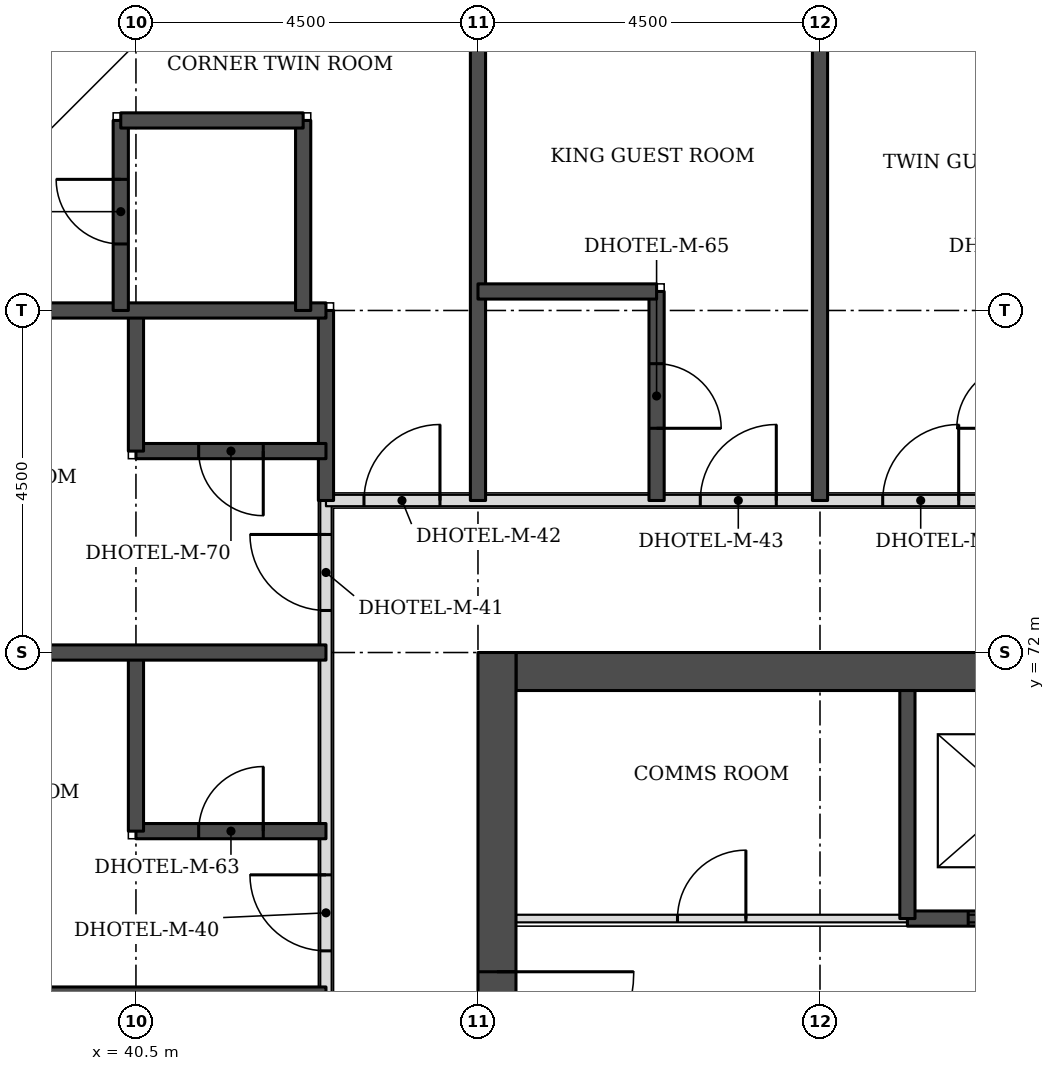
"""IFC4 building model, lengths in metres.
Left out: names, types, materials, properties, quantities, classifications, styles, units other than length and angle.
Written with IfcOpenShell. Run it as: python <this file> out.ifc"""

import sys

from ifc_helpers import new_model, si_unit, direction, frame, frame_2d, origin, place, context, subcontext, project, spatial, rectangle, extrude, element, fill, save


model = new_model("IFC4")
c1 = context("Model", 3, precision=1e-05, world=origin(), true_north=direction((0.0, 1.0)))
c2 = subcontext(c1, "Body", "Model", "MODEL_VIEW")
j1 = project(units=[si_unit("LENGTHUNIT", "METRE"), si_unit("PLANEANGLEUNIT", "RADIAN")], contexts=[c1])
p1 = place(None, origin())
s1 = spatial("IfcSite", under=j1, at=p1, CompositionType="ELEMENT")
p2 = place(p1, origin())
s2 = spatial("IfcBuilding", under=s1, at=p2, CompositionType="ELEMENT")
p3 = place(p2, frame((0.0, 0.0, 23.1)))
s3 = spatial("IfcBuildingStorey", under=s2, at=p3, CompositionType="ELEMENT", Elevation=23.1)
p4 = place(p3, frame((45.5, 71.75, 0.0), z_axis=(0.0, 0.0, 1.0), x_axis=(1.0, 0.0, 0.0)))
e1 = element("IfcWall", 1, at=p4, inside=s3, PredefinedType="SHEAR", context=c2, shape_type="SweptSolid", body=[
    extrude(rectangle(XDim=21.5, YDim=0.5, at=frame_2d((10.75, 0.0))), origin(), (0.0, 0.0, 1.0), 3.3),
])
p5 = place(p3, frame((45.25, 49.5, 0.0), z_axis=(0.0, 0.0, 1.0), x_axis=(0.0, 1.0, 0.0)))
e2 = element("IfcWall", 2, at=p5, inside=s3, PredefinedType="SHEAR", context=c2, shape_type="SweptSolid", body=[
    extrude(rectangle(XDim=22.5, YDim=0.5, at=frame_2d((11.25, 0.0))), origin(), (0.0, 0.0, 1.0), 3.3),
])
p6 = place(p5, frame((4.2, 0.0, 0.0)))
e3 = element("IfcOpeningElement", 3, at=p6, cuts=e2, PredefinedType="OPENING", context=c2, shape_type="SweptSolid", body=[
    extrude(rectangle(XDim=1.8, YDim=2.1, at=frame_2d((0.9, 1.05))), frame((0.0, 0.26, 0.0), z_axis=(0.0, -1.0, 0.0), x_axis=(1.0, 0.0, 0.0)), (0.0, 0.0, 1.0), 0.52),
])
p7 = place(p5, frame((6.9, 0.0, 0.0)))
e4 = element("IfcOpeningElement", 4, at=p7, cuts=e2, PredefinedType="OPENING", context=c2, shape_type="SweptSolid", body=[
    extrude(rectangle(XDim=1.1, YDim=2.1, at=frame_2d((0.55, 1.05))), frame((0.0, 0.26, 0.0), z_axis=(0.0, -1.0, 0.0), x_axis=(1.0, 0.0, 0.0)), (0.0, 0.0, 1.0), 0.52),
])
p8 = place(p5, frame((13.6, 0.0, 0.0)))
e5 = element("IfcOpeningElement", 5, at=p8, cuts=e2, PredefinedType="OPENING", context=c2, shape_type="SweptSolid", body=[
    extrude(rectangle(XDim=1.1, YDim=2.1, at=frame_2d((0.55, 1.05))), frame((0.0, 0.26, 0.0), z_axis=(0.0, -1.0, 0.0), x_axis=(1.0, 0.0, 0.0)), (0.0, 0.0, 1.0), 0.52),
])
p9 = place(p5, frame((16.5, 0.0, 0.0)))
e6 = element("IfcOpeningElement", 6, at=p9, cuts=e2, PredefinedType="OPENING", context=c2, shape_type="SweptSolid", body=[
    extrude(rectangle(XDim=1.8, YDim=2.1, at=frame_2d((0.9, 1.05))), frame((0.0, 0.26, 0.0), z_axis=(0.0, -1.0, 0.0), x_axis=(1.0, 0.0, 0.0)), (0.0, 0.0, 1.0), 0.52),
])
p10 = place(p3, frame((40.23, 81.826, 0.0), z_axis=(0.0, 0.0, 1.0), x_axis=(-0.707106781187, -0.707106781187, 0.0)))
e7 = element("IfcWall", 7, at=p10, inside=s3, PredefinedType="STANDARD", context=c2, shape_type="SweptSolid", body=[
    extrude(rectangle(XDim=7.151, YDim=0.35, at=frame_2d((3.576, 0.0))), origin(), (0.0, 0.0, 1.0), 3.055),
])
p11 = place(p10, frame((1.926, 0.0, 0.8)))
e8 = element("IfcOpeningElement", 8, at=p11, cuts=e7, PredefinedType="OPENING", context=c2, shape_type="SweptSolid", body=[
    extrude(rectangle(XDim=3.3, YDim=1.5, at=frame_2d((1.65, 0.75))), frame((0.0, 0.185, 0.0), z_axis=(0.0, -1.0, 0.0), x_axis=(1.0, 0.0, 0.0)), (0.0, 0.0, 1.0), 0.37),
])
p12 = place(p3, frame((43.0, 56.6, 0.0), z_axis=(0.0, 0.0, 1.0), x_axis=(0.0, 1.0, 0.0)))
e9 = element("IfcWall", 9, at=p12, inside=s3, PredefinedType="PARTITIONING", context=c2, shape_type="SweptSolid", body=[
    extrude(rectangle(XDim=17.4, YDim=0.15, at=frame_2d((8.7, 0.0))), origin(), (0.0, 0.0, 1.0), 3.08),
])
p13 = place(p12, frame((9.075, 0.0, 0.0)))
e10 = element("IfcOpeningElement", 10, at=p13, cuts=e9, PredefinedType="OPENING", context=c2, shape_type="SweptSolid", body=[
    extrude(rectangle(XDim=1.0, YDim=2.1, at=frame_2d((0.5, 1.05))), frame((0.0, 0.085, 0.0), z_axis=(0.0, -1.0, 0.0), x_axis=(1.0, 0.0, 0.0)), (0.0, 0.0, 1.0), 0.17),
])
p14 = place(p12, frame((11.475, 0.0, 0.0)))
e11 = element("IfcOpeningElement", 11, at=p14, cuts=e9, PredefinedType="OPENING", context=c2, shape_type="SweptSolid", body=[
    extrude(rectangle(XDim=1.0, YDim=2.1, at=frame_2d((0.5, 1.05))), frame((0.0, 0.085, 0.0), z_axis=(0.0, -1.0, 0.0), x_axis=(1.0, 0.0, 0.0)), (0.0, 0.0, 1.0), 0.17),
])
p15 = place(p12, frame((15.953, 0.0, 0.0)))
e12 = element("IfcOpeningElement", 12, at=p15, cuts=e9, PredefinedType="OPENING", context=c2, shape_type="SweptSolid", body=[
    extrude(rectangle(XDim=1.0, YDim=2.1, at=frame_2d((0.5, 1.05))), frame((0.0, 0.085, 0.0), z_axis=(0.0, -1.0, 0.0), x_axis=(1.0, 0.0, 0.0)), (0.0, 0.0, 1.0), 0.17),
])
p16 = place(p3, frame((43.0, 74.0, 0.0), z_axis=(0.0, 0.0, 1.0), x_axis=(1.0, 0.0, 0.0)))
e13 = element("IfcWall", 13, at=p16, inside=s3, PredefinedType="PARTITIONING", context=c2, shape_type="SweptSolid", body=[
    extrude(rectangle(XDim=26.5, YDim=0.15, at=frame_2d((13.25, 0.0))), origin(), (0.0, 0.0, 1.0), 3.08),
])
p17 = place(p16, frame((4.925, 0.0, 0.0)))
e14 = element("IfcOpeningElement", 14, at=p17, cuts=e13, PredefinedType="OPENING", context=c2, shape_type="SweptSolid", body=[
    extrude(rectangle(XDim=1.0, YDim=2.1, at=frame_2d((0.5, 1.05))), frame((0.0, 0.085, 0.0), z_axis=(0.0, -1.0, 0.0), x_axis=(1.0, 0.0, 0.0)), (0.0, 0.0, 1.0), 0.17),
])
p18 = place(p16, frame((7.325, 0.0, 0.0)))
e15 = element("IfcOpeningElement", 15, at=p18, cuts=e13, PredefinedType="OPENING", context=c2, shape_type="SweptSolid", body=[
    extrude(rectangle(XDim=1.0, YDim=2.1, at=frame_2d((0.5, 1.05))), frame((0.0, 0.085, 0.0), z_axis=(0.0, -1.0, 0.0), x_axis=(1.0, 0.0, 0.0)), (0.0, 0.0, 1.0), 0.17),
])
p19 = place(p16, frame((13.925, 0.0, 0.0)))
e16 = element("IfcOpeningElement", 16, at=p19, cuts=e13, PredefinedType="OPENING", context=c2, shape_type="SweptSolid", body=[
    extrude(rectangle(XDim=1.0, YDim=2.1, at=frame_2d((0.5, 1.05))), frame((0.0, 0.085, 0.0), z_axis=(0.0, -1.0, 0.0), x_axis=(1.0, 0.0, 0.0)), (0.0, 0.0, 1.0), 0.17),
])
p20 = place(p16, frame((16.325, 0.0, 0.0)))
e17 = element("IfcOpeningElement", 17, at=p20, cuts=e13, PredefinedType="OPENING", context=c2, shape_type="SweptSolid", body=[
    extrude(rectangle(XDim=1.0, YDim=2.1, at=frame_2d((0.5, 1.05))), frame((0.0, 0.085, 0.0), z_axis=(0.0, -1.0, 0.0), x_axis=(1.0, 0.0, 0.0)), (0.0, 0.0, 1.0), 0.17),
])
p21 = place(p16, frame((22.925, 0.0, 0.0)))
e18 = element("IfcOpeningElement", 18, at=p21, cuts=e13, PredefinedType="OPENING", context=c2, shape_type="SweptSolid", body=[
    extrude(rectangle(XDim=1.0, YDim=2.1, at=frame_2d((0.5, 1.05))), frame((0.0, 0.085, 0.0), z_axis=(0.0, -1.0, 0.0), x_axis=(1.0, 0.0, 0.0)), (0.0, 0.0, 1.0), 0.17),
])
p22 = place(p16, frame((0.5, 0.0, 0.0)))
e19 = element("IfcOpeningElement", 19, at=p22, cuts=e13, PredefinedType="OPENING", context=c2, shape_type="SweptSolid", body=[
    extrude(rectangle(XDim=1.0, YDim=2.1, at=frame_2d((0.5, 1.05))), frame((0.0, 0.085, 0.0), z_axis=(0.0, -1.0, 0.0), x_axis=(1.0, 0.0, 0.0)), (0.0, 0.0, 1.0), 0.17),
])
p23 = place(p16, frame((25.0, 0.0, 0.0)))
e20 = element("IfcOpeningElement", 20, at=p23, cuts=e13, PredefinedType="OPENING", context=c2, shape_type="SweptSolid", body=[
    extrude(rectangle(XDim=1.0, YDim=2.1, at=frame_2d((0.5, 1.05))), frame((0.0, 0.085, 0.0), z_axis=(0.0, -1.0, 0.0), x_axis=(1.0, 0.0, 0.0)), (0.0, 0.0, 1.0), 0.17),
])
p24 = place(p3, frame((36.6, 67.5, 0.0), z_axis=(0.0, 0.0, 1.0), x_axis=(1.0, 0.0, 0.0)))
e21 = element("IfcWall", 21, at=p24, inside=s3, PredefinedType="SOLIDWALL", context=c2, shape_type="SweptSolid", body=[
    extrude(rectangle(XDim=6.4, YDim=0.2, at=frame_2d((3.2, 0.0))), origin(), (0.0, 0.0, 1.0), 3.08),
])
p25 = place(p3, frame((40.5, 69.65, 0.0), z_axis=(0.0, 0.0, 1.0), x_axis=(1.0, 0.0, 0.0)))
e22 = element("IfcWall", 22, at=p25, inside=s3, PredefinedType="SOLIDWALL", context=c2, shape_type="SweptSolid", body=[
    extrude(rectangle(XDim=2.5, YDim=0.2, at=frame_2d((1.25, 0.0))), origin(), (0.0, 0.0, 1.0), 3.08),
])
p26 = place(p25, frame((0.825, 0.0, 0.0)))
e23 = element("IfcOpeningElement", 23, at=p26, cuts=e22, PredefinedType="OPENING", context=c2, shape_type="SweptSolid", body=[
    extrude(rectangle(XDim=0.85, YDim=2.1, at=frame_2d((0.425, 1.05))), frame((0.0, 0.11, 0.0), z_axis=(0.0, -1.0, 0.0), x_axis=(1.0, 0.0, 0.0)), (0.0, 0.0, 1.0), 0.22),
])
p27 = place(p3, frame((40.5, 69.65, 0.0), z_axis=(0.0, 0.0, 1.0), x_axis=(0.0, 1.0, 0.0)))
e24 = element("IfcWall", 24, at=p27, inside=s3, PredefinedType="SOLIDWALL", context=c2, shape_type="SweptSolid", body=[
    extrude(rectangle(XDim=2.35, YDim=0.2, at=frame_2d((1.175, 0.0))), origin(), (0.0, 0.0, 1.0), 3.08),
])
p28 = place(p3, frame((36.6, 72.0, 0.0), z_axis=(0.0, 0.0, 1.0), x_axis=(1.0, 0.0, 0.0)))
e25 = element("IfcWall", 25, at=p28, inside=s3, PredefinedType="SOLIDWALL", context=c2, shape_type="SweptSolid", body=[
    extrude(rectangle(XDim=6.4, YDim=0.2, at=frame_2d((3.2, 0.0))), origin(), (0.0, 0.0, 1.0), 3.08),
])
p29 = place(p3, frame((43.0, 74.0, 0.0), z_axis=(0.0, 0.0, 1.0), x_axis=(0.0, 1.0, 0.0)))
e26 = element("IfcWall", 26, at=p29, inside=s3, PredefinedType="SOLIDWALL", context=c2, shape_type="SweptSolid", body=[
    extrude(rectangle(XDim=2.5, YDim=0.2, at=frame_2d((1.25, 0.0))), origin(), (0.0, 0.0, 1.0), 3.08),
])
p30 = place(p3, frame((45.0, 74.0, 0.0), z_axis=(0.0, 0.0, 1.0), x_axis=(0.0, 1.0, 0.0)))
e27 = element("IfcWall", 27, at=p30, inside=s3, PredefinedType="SOLIDWALL", context=c2, shape_type="SweptSolid", body=[
    extrude(rectangle(XDim=6.4, YDim=0.2, at=frame_2d((3.2, 0.0))), origin(), (0.0, 0.0, 1.0), 3.08),
])
p31 = place(p3, frame((47.35, 74.0, 0.0), z_axis=(0.0, 0.0, 1.0), x_axis=(0.0, 1.0, 0.0)))
e28 = element("IfcWall", 28, at=p31, inside=s3, PredefinedType="SOLIDWALL", context=c2, shape_type="SweptSolid", body=[
    extrude(rectangle(XDim=2.75, YDim=0.2, at=frame_2d((1.375, 0.0))), origin(), (0.0, 0.0, 1.0), 3.08),
])
p32 = place(p31, frame((0.95, 0.0, 0.0)))
e29 = element("IfcOpeningElement", 29, at=p32, cuts=e28, PredefinedType="OPENING", context=c2, shape_type="SweptSolid", body=[
    extrude(rectangle(XDim=0.85, YDim=2.1, at=frame_2d((0.425, 1.05))), frame((0.0, 0.11, 0.0), z_axis=(0.0, -1.0, 0.0), x_axis=(1.0, 0.0, 0.0)), (0.0, 0.0, 1.0), 0.22),
])
p33 = place(p3, frame((49.5, 74.0, 0.0), z_axis=(0.0, 0.0, 1.0), x_axis=(0.0, 1.0, 0.0)))
e30 = element("IfcWall", 30, at=p33, inside=s3, PredefinedType="SOLIDWALL", context=c2, shape_type="SweptSolid", body=[
    extrude(rectangle(XDim=6.4, YDim=0.2, at=frame_2d((3.2, 0.0))), origin(), (0.0, 0.0, 1.0), 3.08),
])
p34 = place(p3, frame((40.5, 74.65, 0.0), z_axis=(0.0, 0.0, 1.0), x_axis=(1.0, 0.0, 0.0)))
e31 = element("IfcWall", 31, at=p34, inside=s3, PredefinedType="SOLIDWALL", context=c2, shape_type="SweptSolid", body=[
    extrude(rectangle(XDim=2.5, YDim=0.2, at=frame_2d((1.25, 0.0))), origin(), (0.0, 0.0, 1.0), 3.08),
])
p35 = place(p34, frame((0.825, 0.0, 0.0)))
e32 = element("IfcOpeningElement", 32, at=p35, cuts=e31, PredefinedType="OPENING", context=c2, shape_type="SweptSolid", body=[
    extrude(rectangle(XDim=0.85, YDim=2.1, at=frame_2d((0.425, 1.05))), frame((0.0, 0.11, 0.0), z_axis=(0.0, -1.0, 0.0), x_axis=(1.0, 0.0, 0.0)), (0.0, 0.0, 1.0), 0.22),
])
p36 = place(p3, frame((40.5, 74.65, 0.0), z_axis=(0.0, 0.0, 1.0), x_axis=(0.0, 1.0, 0.0)))
e33 = element("IfcWall", 33, at=p36, inside=s3, PredefinedType="SOLIDWALL", context=c2, shape_type="SweptSolid", body=[
    extrude(rectangle(XDim=1.85, YDim=0.2, at=frame_2d((0.925, 0.0))), origin(), (0.0, 0.0, 1.0), 3.08),
])
p37 = place(p3, frame((36.6, 76.5, 0.0), z_axis=(0.0, 0.0, 1.0), x_axis=(1.0, 0.0, 0.0)))
e34 = element("IfcWall", 34, at=p37, inside=s3, PredefinedType="SOLIDWALL", context=c2, shape_type="SweptSolid", body=[
    extrude(rectangle(XDim=6.4, YDim=0.2, at=frame_2d((3.2, 0.0))), origin(), (0.0, 0.0, 1.0), 3.08),
])
p38 = place(p3, frame((40.3, 76.5, 0.0), z_axis=(0.0, 0.0, 1.0), x_axis=(0.0, 1.0, 0.0)))
e35 = element("IfcWall", 35, at=p38, inside=s3, PredefinedType="SOLIDWALL", context=c2, shape_type="SweptSolid", body=[
    extrude(rectangle(XDim=2.5, YDim=0.2, at=frame_2d((1.25, 0.0))), origin(), (0.0, 0.0, 1.0), 3.08),
])
p39 = place(p38, frame((0.875, 0.0, 0.0)))
e36 = element("IfcOpeningElement", 36, at=p39, cuts=e35, PredefinedType="OPENING", context=c2, shape_type="SweptSolid", body=[
    extrude(rectangle(XDim=0.85, YDim=2.1, at=frame_2d((0.425, 1.05))), frame((0.0, 0.11, 0.0), z_axis=(0.0, -1.0, 0.0), x_axis=(1.0, 0.0, 0.0)), (0.0, 0.0, 1.0), 0.22),
])
p40 = place(p3, frame((42.7, 76.5, 0.0), z_axis=(0.0, 0.0, 1.0), x_axis=(0.0, 1.0, 0.0)))
e37 = element("IfcWall", 37, at=p40, inside=s3, PredefinedType="SOLIDWALL", context=c2, shape_type="SweptSolid", body=[
    extrude(rectangle(XDim=2.5, YDim=0.2, at=frame_2d((1.25, 0.0))), origin(), (0.0, 0.0, 1.0), 3.08),
])
p41 = place(p3, frame((45.0, 76.75, 0.0), z_axis=(0.0, 0.0, 1.0), x_axis=(1.0, 0.0, 0.0)))
e38 = element("IfcWall", 38, at=p41, inside=s3, PredefinedType="SOLIDWALL", context=c2, shape_type="SweptSolid", body=[
    extrude(rectangle(XDim=2.35, YDim=0.2, at=frame_2d((1.175, 0.0))), origin(), (0.0, 0.0, 1.0), 3.08),
])
p42 = place(p3, frame((40.3, 79.0, 0.0), z_axis=(0.0, 0.0, 1.0), x_axis=(1.0, 0.0, 0.0)))
e39 = element("IfcWall", 39, at=p42, inside=s3, PredefinedType="SOLIDWALL", context=c2, shape_type="SweptSolid", body=[
    extrude(rectangle(XDim=2.4, YDim=0.2, at=frame_2d((1.2, 0.0))), origin(), (0.0, 0.0, 1.0), 3.08),
])
p43 = place(p3, frame((45.5, 68.5, 0.0), z_axis=(0.0, 0.0, 1.0), x_axis=(1.0, 0.0, 0.0)))
e40 = element("IfcWall", 40, at=p43, inside=s3, PredefinedType="PARTITIONING", context=c2, shape_type="SweptSolid", body=[
    extrude(rectangle(XDim=5.15, YDim=0.1, at=frame_2d((2.575, 0.0))), origin(), (0.0, 0.0, 1.0), 3.08),
])
p44 = place(p43, frame((2.125, 0.0, 0.0)))
e41 = element("IfcOpeningElement", 41, at=p44, cuts=e40, PredefinedType="OPENING", context=c2, shape_type="SweptSolid", body=[
    extrude(rectangle(XDim=0.9, YDim=2.1, at=frame_2d((0.45, 1.05))), frame((0.0, 0.06, 0.0), z_axis=(0.0, -1.0, 0.0), x_axis=(1.0, 0.0, 0.0)), (0.0, 0.0, 1.0), 0.12),
])
p45 = place(p3, frame((50.65, 68.5, 0.0), z_axis=(0.0, 0.0, 1.0), x_axis=(1.0, 0.0, 0.0)))
e42 = element("IfcWall", 42, at=p45, inside=s3, PredefinedType="SOLIDWALL", context=c2, shape_type="SweptSolid", body=[
    extrude(rectangle(XDim=11.2, YDim=0.2, at=frame_2d((5.6, 0.0))), origin(), (0.0, 0.0, 1.0), 3.08),
])
p46 = place(p45, frame((0.8, 0.0, 0.0)))
e43 = element("IfcOpeningElement", 43, at=p46, cuts=e42, PredefinedType="OPENING", context=c2, shape_type="SweptSolid", body=[
    extrude(rectangle(XDim=1.2, YDim=2.1, at=frame_2d((0.6, 1.05))), frame((0.0, 0.11, 0.0), z_axis=(0.0, -1.0, 0.0), x_axis=(1.0, 0.0, 0.0)), (0.0, 0.0, 1.0), 0.22),
])
p47 = place(p45, frame((3.6, 0.0, 0.0)))
e44 = element("IfcOpeningElement", 44, at=p47, cuts=e42, PredefinedType="OPENING", context=c2, shape_type="SweptSolid", body=[
    extrude(rectangle(XDim=1.2, YDim=2.1, at=frame_2d((0.6, 1.05))), frame((0.0, 0.11, 0.0), z_axis=(0.0, -1.0, 0.0), x_axis=(1.0, 0.0, 0.0)), (0.0, 0.0, 1.0), 0.22),
])
p48 = place(p45, frame((6.4, 0.0, 0.0)))
e45 = element("IfcOpeningElement", 45, at=p48, cuts=e42, PredefinedType="OPENING", context=c2, shape_type="SweptSolid", body=[
    extrude(rectangle(XDim=1.2, YDim=2.1, at=frame_2d((0.6, 1.05))), frame((0.0, 0.11, 0.0), z_axis=(0.0, -1.0, 0.0), x_axis=(1.0, 0.0, 0.0)), (0.0, 0.0, 1.0), 0.22),
])
p49 = place(p45, frame((9.2, 0.0, 0.0)))
e46 = element("IfcOpeningElement", 46, at=p49, cuts=e42, PredefinedType="OPENING", context=c2, shape_type="SweptSolid", body=[
    extrude(rectangle(XDim=1.2, YDim=2.1, at=frame_2d((0.6, 1.05))), frame((0.0, 0.11, 0.0), z_axis=(0.0, -1.0, 0.0), x_axis=(1.0, 0.0, 0.0)), (0.0, 0.0, 1.0), 0.22),
])
p50 = place(p3, frame((50.65, 68.5, 0.0), z_axis=(0.0, 0.0, 1.0), x_axis=(0.0, 1.0, 0.0)))
e47 = element("IfcWall", 47, at=p50, inside=s3, PredefinedType="SOLIDWALL", context=c2, shape_type="SweptSolid", body=[
    extrude(rectangle(XDim=3.0, YDim=0.2, at=frame_2d((1.5, 0.0))), origin(), (0.0, 0.0, 1.0), 3.08),
])
p51 = place(p14, origin())
e48 = element("IfcDoor", 48, at=p51, inside=s3, OperationType="SINGLE_SWING_RIGHT", PredefinedType="DOOR", context=c2, shape_type="SweptSolid", body=[
    extrude(rectangle(XDim=1.0, YDim=2.1, at=frame_2d((0.5, 1.05))), frame((0.0, 0.025, 0.0), z_axis=(0.0, -1.0, 0.0), x_axis=(1.0, 0.0, 0.0)), (0.0, 0.0, 1.0), 0.05),
])
fill(e11, e48)
p52 = place(p26, origin())
e49 = element("IfcDoor", 49, at=p52, inside=s3, OperationType="SINGLE_SWING_RIGHT", PredefinedType="DOOR", context=c2, shape_type="SweptSolid", body=[
    extrude(rectangle(XDim=0.85, YDim=2.1, at=frame_2d((0.425, 1.05))), frame((0.0, 0.025, 0.0), z_axis=(0.0, -1.0, 0.0), x_axis=(1.0, 0.0, 0.0)), (0.0, 0.0, 1.0), 0.05),
])
fill(e23, e49)
p53 = place(p15, origin())
e50 = element("IfcDoor", 50, at=p53, inside=s3, OperationType="SINGLE_SWING_RIGHT", PredefinedType="DOOR", context=c2, shape_type="SweptSolid", body=[
    extrude(rectangle(XDim=1.0, YDim=2.1, at=frame_2d((0.5, 1.05))), frame((0.0, 0.025, 0.0), z_axis=(0.0, -1.0, 0.0), x_axis=(1.0, 0.0, 0.0)), (0.0, 0.0, 1.0), 0.05),
])
fill(e12, e50)
p54 = place(p35, frame((0.85, 0.0, 0.0), z_axis=(0.0, 0.0, 1.0), x_axis=(-1.0, 0.0, 0.0)))
e51 = element("IfcDoor", 51, at=p54, inside=s3, OperationType="SINGLE_SWING_LEFT", PredefinedType="DOOR", context=c2, shape_type="SweptSolid", body=[
    extrude(rectangle(XDim=0.85, YDim=2.1, at=frame_2d((0.425, 1.05))), frame((0.0, 0.025, 0.0), z_axis=(0.0, -1.0, 0.0), x_axis=(1.0, 0.0, 0.0)), (0.0, 0.0, 1.0), 0.05),
])
fill(e32, e51)
p55 = place(p17, origin())
e52 = element("IfcDoor", 52, at=p55, inside=s3, OperationType="SINGLE_SWING_RIGHT", PredefinedType="DOOR", context=c2, shape_type="SweptSolid", body=[
    extrude(rectangle(XDim=1.0, YDim=2.1, at=frame_2d((0.5, 1.05))), frame((0.0, 0.025, 0.0), z_axis=(0.0, -1.0, 0.0), x_axis=(1.0, 0.0, 0.0)), (0.0, 0.0, 1.0), 0.05),
])
fill(e14, e52)
p56 = place(p32, frame((0.85, 0.0, 0.0), z_axis=(0.0, 0.0, 1.0), x_axis=(-1.0, 0.0, 0.0)))
e53 = element("IfcDoor", 53, at=p56, inside=s3, OperationType="SINGLE_SWING_RIGHT", PredefinedType="DOOR", context=c2, shape_type="SweptSolid", body=[
    extrude(rectangle(XDim=0.85, YDim=2.1, at=frame_2d((0.425, 1.05))), frame((0.0, 0.025, 0.0), z_axis=(0.0, -1.0, 0.0), x_axis=(1.0, 0.0, 0.0)), (0.0, 0.0, 1.0), 0.05),
])
fill(e29, e53)
p57 = place(p18, origin())
e54 = element("IfcDoor", 54, at=p57, inside=s3, OperationType="SINGLE_SWING_RIGHT", PredefinedType="DOOR", context=c2, shape_type="SweptSolid", body=[
    extrude(rectangle(XDim=1.0, YDim=2.1, at=frame_2d((0.5, 1.05))), frame((0.0, 0.025, 0.0), z_axis=(0.0, -1.0, 0.0), x_axis=(1.0, 0.0, 0.0)), (0.0, 0.0, 1.0), 0.05),
])
fill(e15, e54)
p58 = place(p22, origin())
e55 = element("IfcDoor", 55, at=p58, inside=s3, OperationType="SINGLE_SWING_RIGHT", PredefinedType="DOOR", context=c2, shape_type="SweptSolid", body=[
    extrude(rectangle(XDim=1.0, YDim=2.1, at=frame_2d((0.5, 1.05))), frame((0.0, 0.025, 0.0), z_axis=(0.0, -1.0, 0.0), x_axis=(1.0, 0.0, 0.0)), (0.0, 0.0, 1.0), 0.05),
])
fill(e19, e55)
p59 = place(p39, origin())
e56 = element("IfcDoor", 56, at=p59, inside=s3, OperationType="SINGLE_SWING_RIGHT", PredefinedType="DOOR", context=c2, shape_type="SweptSolid", body=[
    extrude(rectangle(XDim=0.85, YDim=2.1, at=frame_2d((0.425, 1.05))), frame((0.0, 0.025, 0.0), z_axis=(0.0, -1.0, 0.0), x_axis=(1.0, 0.0, 0.0)), (0.0, 0.0, 1.0), 0.05),
])
fill(e36, e56)
p60 = place(p46, origin())
e57 = element("IfcDoor", 57, at=p60, inside=s3, OperationType="DOUBLE_DOOR_SLIDING", PredefinedType="DOOR", context=c2, shape_type="SweptSolid", body=[
    extrude(rectangle(XDim=1.2, YDim=2.1, at=frame_2d((0.6, 1.05))), frame((0.0, 0.025, 0.0), z_axis=(0.0, -1.0, 0.0), x_axis=(1.0, 0.0, 0.0)), (0.0, 0.0, 1.0), 0.05),
])
fill(e43, e57)
p61 = place(p9, frame((1.8, 0.0, 0.0), z_axis=(0.0, 0.0, 1.0), x_axis=(-1.0, 0.0, 0.0)))
e58 = element("IfcDoor", 58, at=p61, inside=s3, OperationType="SINGLE_SWING_LEFT", PredefinedType="DOOR", context=c2, shape_type="SweptSolid", body=[
    extrude(rectangle(XDim=1.8, YDim=2.1, at=frame_2d((0.9, 1.05))), frame((0.0, 0.025, 0.0), z_axis=(0.0, -1.0, 0.0), x_axis=(1.0, 0.0, 0.0)), (0.0, 0.0, 1.0), 0.05),
])
fill(e6, e58)
p62 = place(p44, origin())
e59 = element("IfcDoor", 59, at=p62, inside=s3, OperationType="SINGLE_SWING_RIGHT", PredefinedType="DOOR", context=c2, shape_type="SweptSolid", body=[
    extrude(rectangle(XDim=0.9, YDim=2.1, at=frame_2d((0.45, 1.05))), frame((0.0, 0.025, 0.0), z_axis=(0.0, -1.0, 0.0), x_axis=(1.0, 0.0, 0.0)), (0.0, 0.0, 1.0), 0.05),
])
fill(e41, e59)
save(model, sys.argv[1])
